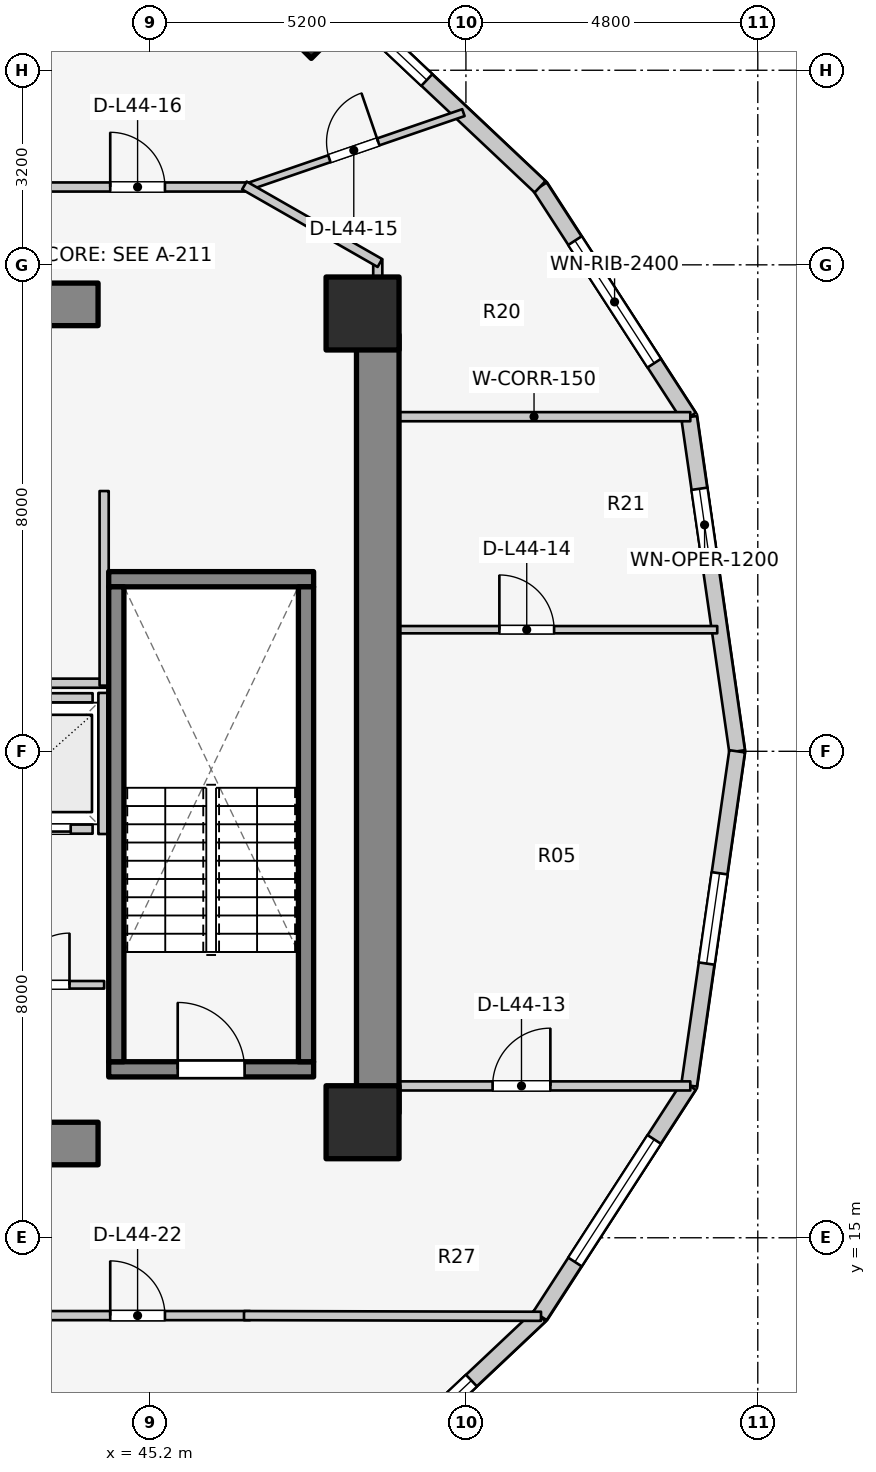
"""IFC4 building model, lengths in metres.
Left out: names, types, materials, properties, quantities, classifications, styles, units other than length and angle.
Written with IfcOpenShell. Run it as: python <this file> out.ifc"""

import sys

from ifc_helpers import new_model, si_unit, direction, frame, frame_2d, origin, origin_2d, place, context, subcontext, project, spatial, rectangle, extrude, element, fill, save


model = new_model("IFC4")
c1 = context("Model", 3, precision=1e-05, world=origin(), true_north=direction((0.0, 1.0)))
c2 = subcontext(c1, "Body", "Model", "MODEL_VIEW")
j1 = project(units=[si_unit("LENGTHUNIT", "METRE"), si_unit("PLANEANGLEUNIT", "RADIAN")], contexts=[c1])
p1 = place(None, origin())
s1 = spatial("IfcSite", under=j1, at=p1, CompositionType="ELEMENT")
p2 = place(p1, origin())
s2 = spatial("IfcBuilding", under=s1, at=p2, CompositionType="ELEMENT")
p3 = place(p2, frame((0.0, 0.0, 146.7)))
s3 = spatial("IfcBuildingStorey", under=s2, at=p3, CompositionType="ELEMENT", Elevation=146.7)
p4 = place(p3, frame((48.95, 17.05, 0.0), z_axis=(0.0, 0.0, 1.0), x_axis=(0.0, 1.0, 0.0)))
e1 = element("IfcWall", 1, at=p4, inside=s3, PredefinedType="SHEAR", context=c2, shape_type="SweptSolid", body=[
    extrude(rectangle(XDim=12.8, YDim=0.7, at=frame_2d((6.4, 0.0))), origin(), (0.0, 0.0, 1.0), 3.1),
])
for number, where, z_axis, x_axis in (
    (2, (39.85, 16.55, 0.0), (0.0, 0.0, 1.0), (1.0, 0.0, 0.0)),
    (3, (39.85, 30.35, 0.0), (0.0, 0.0, 1.0), (1.0, 0.0, 0.0)),
):
    element("IfcWall", number, at=place(p3, frame(where, z_axis=z_axis, x_axis=x_axis)), inside=s3, PredefinedType="SHEAR", context=c2, shape_type="SweptSolid", body=[
        extrude(rectangle(XDim=4.5, YDim=0.7, at=frame_2d((2.25, 0.0))), origin(), (0.0, 0.0, 1.0), 3.1),
    ])
p5 = place(p3, frame((44.525, 17.77, 0.0), z_axis=(0.0, 0.0, 1.0), x_axis=(1.0, 0.0, 0.0)))
e4 = element("IfcWall", 4, at=p5, inside=s3, PredefinedType="SOLIDWALL", context=c2, shape_type="SweptSolid", body=[
    extrude(rectangle(XDim=3.37, YDim=0.25, at=frame_2d((1.685, 0.0))), origin(), (0.0, 0.0, 1.0), 3.1),
])
p6 = place(p5, frame((1.135, 0.0, 0.0)))
e5 = element("IfcOpeningElement", 5, at=p6, cuts=e4, PredefinedType="OPENING", context=c2, shape_type="SweptSolid", body=[
    extrude(rectangle(XDim=1.1, YDim=2.1, at=frame_2d((0.55, 1.05))), frame((0.0, 0.135, 0.0), z_axis=(0.0, -1.0, 0.0), x_axis=(1.0, 0.0, 0.0)), (0.0, 0.0, 1.0), 0.27),
])
p7 = place(p3, frame((44.525, 25.83, 0.0), z_axis=(0.0, 0.0, 1.0), x_axis=(1.0, 0.0, 0.0)))
e6 = element("IfcWall", 6, at=p7, inside=s3, PredefinedType="SOLIDWALL", context=c2, shape_type="SweptSolid", body=[
    extrude(rectangle(XDim=3.37, YDim=0.25, at=frame_2d((1.685, 0.0))), origin(), (0.0, 0.0, 1.0), 3.1),
])
for number, where, z_axis, x_axis in (
    (7, (44.65, 17.895, 0.0), (0.0, 0.0, 1.0), (0.0, 1.0, 0.0)),
    (8, (47.77, 17.895, 0.0), (0.0, 0.0, 1.0), (0.0, 1.0, 0.0)),
):
    element("IfcWall", number, at=place(p3, frame(where, z_axis=z_axis, x_axis=x_axis)), inside=s3, PredefinedType="SOLIDWALL", context=c2, shape_type="SweptSolid", body=[
        extrude(rectangle(XDim=7.81, YDim=0.25, at=frame_2d((3.905, 0.0))), origin(), (0.0, 0.0, 1.0), 3.1),
    ])
for number, where, z_axis, x_axis in (
    (9, (48.7, 16.9, 0.0), (0.0, 0.0, 1.0), (1.0, 0.0, 0.0)),
    (10, (48.7, 30.2, 0.0), (0.0, 0.0, 1.0), (1.0, 0.0, 0.0)),
):
    element("IfcColumn", number, at=place(p3, frame(where, z_axis=z_axis, x_axis=x_axis)), inside=s3, PredefinedType="COLUMN", context=c2, shape_type="SweptSolid", body=[
        extrude(rectangle(XDim=1.2, YDim=1.2, at=origin_2d()), origin(), (0.0, 0.0, 1.0), 3.1),
    ])
p8 = place(p3, frame((47.857, 35.031, 0.0), z_axis=(0.0, 0.0, 1.0), x_axis=(0.707106781187, 0.707106781187, 0.0)))
e11 = element("IfcColumn", 11, at=p8, inside=s3, PredefinedType="COLUMN", context=c2, shape_type="SweptSolid", body=[
    extrude(rectangle(XDim=0.9, YDim=0.9, at=origin_2d()), origin(), (0.0, 0.0, 1.0), 3.1),
])
p9 = place(p3, frame((54.86, 23.0, 0.0), z_axis=(0.0, 0.0, 1.0), x_axis=(-0.142227632286, 0.989833976288, 0.0)))
e12 = element("IfcWall", 12, at=p9, inside=s3, PredefinedType="STANDARD", context=c2, shape_type="SweptSolid", body=[
    extrude(rectangle(XDim=5.553, YDim=0.26, at=frame_2d((2.776, 0.0))), origin(), (0.0, 0.0, 1.0), 2.85),
])
p10 = place(p9, frame((3.162, 0.0, 0.75)))
e13 = element("IfcOpeningElement", 13, at=p10, cuts=e12, PredefinedType="OPENING", context=c2, shape_type="SweptSolid", body=[
    extrude(rectangle(XDim=1.2, YDim=1.5, at=frame_2d((0.6, 0.75))), frame((0.0, 0.14, 0.0), z_axis=(0.0, -1.0, 0.0), x_axis=(1.0, 0.0, 0.0)), (0.0, 0.0, 1.0), 0.28),
])
p11 = place(p3, frame((54.07, 28.497, 0.0), z_axis=(0.0, 0.0, 1.0), x_axis=(-0.543358984534, 0.839500454989, 0.0)))
e14 = element("IfcWall", 14, at=p11, inside=s3, PredefinedType="STANDARD", context=c2, shape_type="SweptSolid", body=[
    extrude(rectangle(XDim=4.511, YDim=0.26, at=frame_2d((2.256, 0.0))), origin(), (0.0, 0.0, 1.0), 2.85),
])
p12 = place(p11, frame((1.056, 0.0, 0.75)))
e15 = element("IfcOpeningElement", 15, at=p12, cuts=e14, PredefinedType="OPENING", context=c2, shape_type="SweptSolid", body=[
    extrude(rectangle(XDim=2.4, YDim=1.7, at=frame_2d((1.2, 0.85))), frame((0.0, 0.14, 0.0), z_axis=(0.0, -1.0, 0.0), x_axis=(1.0, 0.0, 0.0)), (0.0, 0.0, 1.0), 0.28),
])
p13 = place(p3, frame((51.619, 32.284, 0.0), z_axis=(0.0, 0.0, 1.0), x_axis=(-0.727667301037, 0.68593024354, 0.0)))
e16 = element("IfcWall", 16, at=p13, inside=s3, PredefinedType="STANDARD", context=c2, shape_type="SweptSolid", body=[
    extrude(rectangle(XDim=4.604, YDim=0.26, at=frame_2d((2.302, 0.0))), origin(), (0.0, 0.0, 1.0), 2.85),
])
p14 = place(p13, frame((2.56, 0.0, 0.75)))
e17 = element("IfcOpeningElement", 17, at=p14, cuts=e16, PredefinedType="OPENING", context=c2, shape_type="SweptSolid", body=[
    extrude(rectangle(XDim=1.2, YDim=1.5, at=frame_2d((0.6, 0.75))), frame((0.0, 0.14, 0.0), z_axis=(0.0, -1.0, 0.0), x_axis=(1.0, 0.0, 0.0)), (0.0, 0.0, 1.0), 0.28),
])
p15 = place(p3, frame((48.269, 10.559, 0.0), z_axis=(0.0, 0.0, 1.0), x_axis=(0.727667301037, 0.68593024354, 0.0)))
e18 = element("IfcWall", 18, at=p15, inside=s3, PredefinedType="STANDARD", context=c2, shape_type="SweptSolid", body=[
    extrude(rectangle(XDim=4.604, YDim=0.26, at=frame_2d((2.302, 0.0))), origin(), (0.0, 0.0, 1.0), 2.85),
])
p16 = place(p15, frame((1.552, 0.0, 0.75)))
e19 = element("IfcOpeningElement", 19, at=p16, cuts=e18, PredefinedType="OPENING", context=c2, shape_type="SweptSolid", body=[
    extrude(rectangle(XDim=1.5, YDim=1.6, at=frame_2d((0.75, 0.8))), frame((0.0, 0.14, 0.0), z_axis=(0.0, -1.0, 0.0), x_axis=(1.0, 0.0, 0.0)), (0.0, 0.0, 1.0), 0.28),
])
p17 = place(p3, frame((51.619, 13.716, 0.0), z_axis=(0.0, 0.0, 1.0), x_axis=(0.543358984534, 0.839500454989, 0.0)))
e20 = element("IfcWall", 20, at=p17, inside=s3, PredefinedType="STANDARD", context=c2, shape_type="SweptSolid", body=[
    extrude(rectangle(XDim=4.511, YDim=0.26, at=frame_2d((2.256, 0.0))), origin(), (0.0, 0.0, 1.0), 2.85),
])
p18 = place(p17, frame((1.056, 0.0, 0.75)))
e21 = element("IfcOpeningElement", 21, at=p18, cuts=e20, PredefinedType="OPENING", context=c2, shape_type="SweptSolid", body=[
    extrude(rectangle(XDim=2.4, YDim=1.7, at=frame_2d((1.2, 0.85))), frame((0.0, 0.14, 0.0), z_axis=(0.0, -1.0, 0.0), x_axis=(1.0, 0.0, 0.0)), (0.0, 0.0, 1.0), 0.28),
])
p19 = place(p3, frame((54.07, 17.503, 0.0), z_axis=(0.0, 0.0, 1.0), x_axis=(0.142227632286, 0.989833976288, 0.0)))
e22 = element("IfcWall", 22, at=p19, inside=s3, PredefinedType="STANDARD", context=c2, shape_type="SweptSolid", body=[
    extrude(rectangle(XDim=5.553, YDim=0.26, at=frame_2d((2.776, 0.0))), origin(), (0.0, 0.0, 1.0), 2.85),
])
p20 = place(p19, frame((2.027, 0.0, 0.75)))
e23 = element("IfcOpeningElement", 23, at=p20, cuts=e22, PredefinedType="OPENING", context=c2, shape_type="SweptSolid", body=[
    extrude(rectangle(XDim=1.5, YDim=1.6, at=frame_2d((0.75, 0.8))), frame((0.0, 0.14, 0.0), z_axis=(0.0, -1.0, 0.0), x_axis=(1.0, 0.0, 0.0)), (0.0, 0.0, 1.0), 0.28),
])
p21 = place(p3, frame((42.44, 21.72, 0.0), z_axis=(0.0, 0.0, 1.0), x_axis=(1.0, 0.0, 0.0)))
e24 = element("IfcWall", 24, at=p21, inside=s3, PredefinedType="SOLIDWALL", context=c2, shape_type="SweptSolid", body=[
    extrude(rectangle(XDim=1.82, YDim=0.15, at=frame_2d((0.91, 0.0))), origin(), (0.0, 0.0, 1.0), 2.855),
])
p22 = place(p21, frame((0.36, 0.0, 0.0)))
e25 = element("IfcOpeningElement", 25, at=p22, cuts=e24, PredefinedType="OPENING", context=c2, shape_type="SweptSolid", body=[
    extrude(rectangle(XDim=1.1, YDim=2.1, at=frame_2d((0.55, 1.05))), frame((0.0, 0.085, 0.0), z_axis=(0.0, -1.0, 0.0), x_axis=(1.0, 0.0, 0.0)), (0.0, 0.0, 1.0), 0.17),
])
p23 = place(p3, frame((42.44, 23.88, 0.0), z_axis=(0.0, 0.0, 1.0), x_axis=(1.0, 0.0, 0.0)))
e26 = element("IfcWall", 26, at=p23, inside=s3, PredefinedType="SOLIDWALL", context=c2, shape_type="SweptSolid", body=[
    extrude(rectangle(XDim=1.82, YDim=0.15, at=frame_2d((0.91, 0.0))), origin(), (0.0, 0.0, 1.0), 2.855),
])
p24 = place(p3, frame((44.43, 21.64, 0.0), z_axis=(0.0, 0.0, 1.0), x_axis=(0.0, 1.0, 0.0)))
e27 = element("IfcWall", 27, at=p24, inside=s3, PredefinedType="SOLIDWALL", context=c2, shape_type="SweptSolid", body=[
    extrude(rectangle(XDim=2.32, YDim=0.15, at=frame_2d((1.16, 0.0))), origin(), (0.0, 0.0, 1.0), 2.855),
])
p25 = place(p3, frame((39.4, 24.12, 0.0), z_axis=(0.0, 0.0, 1.0), x_axis=(1.0, 0.0, 0.0)))
e28 = element("IfcWall", 28, at=p25, inside=s3, PredefinedType="PARTITIONING", context=c2, shape_type="SweptSolid", body=[
    extrude(rectangle(XDim=5.08, YDim=0.15, at=frame_2d((2.54, 0.0))), origin(), (0.0, 0.0, 1.0), 2.12),
])
p26 = place(p3, frame((44.45, 24.08, 0.0), z_axis=(0.0, 0.0, 1.0), x_axis=(0.0, 1.0, 0.0)))
e29 = element("IfcWall", 29, at=p26, inside=s3, PredefinedType="PARTITIONING", context=c2, shape_type="SweptSolid", body=[
    extrude(rectangle(XDim=3.2, YDim=0.15, at=frame_2d((1.6, 0.0))), origin(), (0.0, 0.0, 1.0), 2.855),
])
p27 = place(p3, frame((39.58, 19.16, 0.0), z_axis=(0.0, 0.0, 1.0), x_axis=(1.0, 0.0, 0.0)))
e30 = element("IfcWall", 30, at=p27, inside=s3, PredefinedType="PARTITIONING", context=c2, shape_type="SweptSolid", body=[
    extrude(rectangle(XDim=4.87, YDim=0.125, at=frame_2d((2.435, 0.0))), origin(), (0.0, 0.0, 1.0), 2.12),
])
p28 = place(p27, frame((3.45, 0.0, 0.0)))
e31 = element("IfcOpeningElement", 31, at=p28, cuts=e30, PredefinedType="OPENING", context=c2, shape_type="SweptSolid", body=[
    extrude(rectangle(XDim=0.85, YDim=2.05, at=frame_2d((0.425, 1.025))), frame((0.0, 0.073, 0.0), z_axis=(0.0, -1.0, 0.0), x_axis=(1.0, 0.0, 0.0)), (0.0, 0.0, 1.0), 0.145),
])
p29 = place(p3, frame((48.95, 17.497, 0.0), z_axis=(0.0, 0.0, 1.0), x_axis=(1.0, 0.0, 0.0)))
e32 = element("IfcWall", 32, at=p29, inside=s3, PredefinedType="PARTITIONING", context=c2, shape_type="SweptSolid", body=[
    extrude(rectangle(XDim=5.14, YDim=0.15, at=frame_2d((2.57, 0.0))), origin(), (0.0, 0.0, 1.0), 2.855),
])
p30 = place(p29, frame((1.889, 0.0, 0.0)))
e33 = element("IfcOpeningElement", 33, at=p30, cuts=e32, PredefinedType="OPENING", context=c2, shape_type="SweptSolid", body=[
    extrude(rectangle(XDim=0.95, YDim=2.1, at=frame_2d((0.475, 1.05))), frame((0.0, 0.085, 0.0), z_axis=(0.0, -1.0, 0.0), x_axis=(1.0, 0.0, 0.0)), (0.0, 0.0, 1.0), 0.17),
])
p31 = place(p3, frame((48.95, 28.503, 0.0), z_axis=(0.0, 0.0, 1.0), x_axis=(1.0, 0.0, 0.0)))
e34 = element("IfcWall", 34, at=p31, inside=s3, PredefinedType="PARTITIONING", context=c2, shape_type="SweptSolid", body=[
    extrude(rectangle(XDim=5.14, YDim=0.15, at=frame_2d((2.57, 0.0))), origin(), (0.0, 0.0, 1.0), 2.855),
])
p32 = place(p3, frame((48.95, 25.0, 0.0), z_axis=(0.0, 0.0, 1.0), x_axis=(1.0, 0.0, 0.0)))
e35 = element("IfcWall", 35, at=p32, inside=s3, PredefinedType="MOVABLE", context=c2, shape_type="SweptSolid", body=[
    extrude(rectangle(XDim=5.583, YDim=0.12, at=frame_2d((2.792, 0.0))), origin(), (0.0, 0.0, 1.0), 2.855),
])
p33 = place(p32, frame((2.0, 0.0, 0.0)))
e36 = element("IfcOpeningElement", 36, at=p33, cuts=e35, PredefinedType="OPENING", context=c2, shape_type="SweptSolid", body=[
    extrude(rectangle(XDim=0.9, YDim=2.1, at=frame_2d((0.45, 1.05))), frame((0.0, 0.07, 0.0), z_axis=(0.0, -1.0, 0.0), x_axis=(1.0, 0.0, 0.0)), (0.0, 0.0, 1.0), 0.14),
])
p34 = place(p3, frame((48.95, 29.8, 0.0), z_axis=(0.0, 0.0, 1.0), x_axis=(0.0, 1.0, 0.0)))
e37 = element("IfcWall", 37, at=p34, inside=s3, PredefinedType="PARTITIONING", context=c2, shape_type="SweptSolid", body=[
    extrude(rectangle(XDim=1.29, YDim=0.15, at=frame_2d((0.645, 0.0))), origin(), (0.0, 0.0, 1.0), 2.855),
])
p35 = place(p3, frame((46.753, 32.264, 0.0), z_axis=(0.0, 0.0, 1.0), x_axis=(0.945683523506, 0.325088716151, 0.0)))
e38 = element("IfcWall", 38, at=p35, inside=s3, PredefinedType="MOVABLE", context=c2, shape_type="SweptSolid", body=[
    extrude(rectangle(XDim=3.813, YDim=0.12, at=frame_2d((1.906, 0.0))), origin(), (0.0, 0.0, 1.0), 2.22),
])
p36 = place(p35, frame((1.481, 0.0, 0.0)))
e39 = element("IfcOpeningElement", 39, at=p36, cuts=e38, PredefinedType="OPENING", context=c2, shape_type="SweptSolid", body=[
    extrude(rectangle(XDim=0.85, YDim=2.05, at=frame_2d((0.425, 1.025))), frame((0.0, 0.07, 0.0), z_axis=(0.0, -1.0, 0.0), x_axis=(1.0, 0.0, 0.0)), (0.0, 0.0, 1.0), 0.14),
])
p37 = place(p3, frame((39.33, 32.28, 0.0), z_axis=(0.0, 0.0, 1.0), x_axis=(1.0, 0.0, 0.0)))
e40 = element("IfcWall", 40, at=p37, inside=s3, PredefinedType="PARTITIONING", context=c2, shape_type="SweptSolid", body=[
    extrude(rectangle(XDim=7.52, YDim=0.15, at=frame_2d((3.76, 0.0))), origin(), (0.0, 0.0, 1.0), 2.299),
])
p38 = place(p37, frame((5.22, 0.0, 0.0)))
e41 = element("IfcOpeningElement", 41, at=p38, cuts=e40, PredefinedType="OPENING", context=c2, shape_type="SweptSolid", body=[
    extrude(rectangle(XDim=0.9, YDim=2.1, at=frame_2d((0.45, 1.05))), frame((0.0, 0.085, 0.0), z_axis=(0.0, -1.0, 0.0), x_axis=(1.0, 0.0, 0.0)), (0.0, 0.0, 1.0), 0.17),
])
p39 = place(p3, frame((46.757, 32.305, 0.0), z_axis=(0.0, 0.0, 1.0), x_axis=(0.867991349648, -0.496579315857, 0.0)))
e42 = element("IfcWall", 42, at=p39, inside=s3, PredefinedType="PARTITIONING", context=c2, shape_type="SweptSolid", body=[
    extrude(rectangle(XDim=2.567, YDim=0.15, at=frame_2d((1.283, 0.0))), origin(), (0.0, 0.0, 1.0), 2.22),
])
p40 = place(p3, frame((39.33, 13.72, 0.0), z_axis=(0.0, 0.0, 1.0), x_axis=(1.0, 0.0, 0.0)))
e43 = element("IfcWall", 43, at=p40, inside=s3, PredefinedType="PARTITIONING", context=c2, shape_type="SweptSolid", body=[
    extrude(rectangle(XDim=7.52, YDim=0.15, at=frame_2d((3.76, 0.0))), origin(), (0.0, 0.0, 1.0), 2.299),
])
p41 = place(p40, frame((5.22, 0.0, 0.0)))
e44 = element("IfcOpeningElement", 44, at=p41, cuts=e43, PredefinedType="OPENING", context=c2, shape_type="SweptSolid", body=[
    extrude(rectangle(XDim=0.9, YDim=2.1, at=frame_2d((0.45, 1.05))), frame((0.0, 0.085, 0.0), z_axis=(0.0, -1.0, 0.0), x_axis=(1.0, 0.0, 0.0)), (0.0, 0.0, 1.0), 0.17),
])
p42 = place(p3, frame((46.75, 13.72, 0.0), z_axis=(0.0, 0.0, 1.0), x_axis=(0.999997122315, -0.00239903348, 0.0)))
e45 = element("IfcWall", 45, at=p42, inside=s3, PredefinedType="PARTITIONING", context=c2, shape_type="SweptSolid", body=[
    extrude(rectangle(XDim=4.885, YDim=0.15, at=frame_2d((2.442, 0.0))), origin(), (0.0, 0.0, 1.0), 2.22),
])
p43 = place(p3, frame((37.875, 33.816, 0.0), z_axis=(0.0, 0.0, 1.0), x_axis=(0.849008457073, 0.528379257559, 0.0)))
e46 = element("IfcWall", 46, at=p43, inside=s3, PredefinedType="PARTITIONING", context=c2, shape_type="SweptSolid", body=[
    extrude(rectangle(XDim=7.077, YDim=0.125, at=frame_2d((3.539, 0.0))), origin(), (0.0, 0.0, 1.0), 2.299),
])
p44 = place(p10, origin())
e47 = element("IfcWindow", 47, at=p44, inside=s3, PartitioningType="SINGLE_PANEL", PredefinedType="WINDOW", context=c2, shape_type="SweptSolid", body=[
    extrude(rectangle(XDim=1.2, YDim=1.5, at=frame_2d((0.6, 0.75))), frame((0.0, 0.03, 0.0), z_axis=(0.0, -1.0, 0.0), x_axis=(1.0, 0.0, 0.0)), (0.0, 0.0, 1.0), 0.06),
])
fill(e13, e47)
p45 = place(p12, origin())
e48 = element("IfcWindow", 48, at=p45, inside=s3, PartitioningType="SINGLE_PANEL", PredefinedType="WINDOW", context=c2, shape_type="SweptSolid", body=[
    extrude(rectangle(XDim=2.4, YDim=1.7, at=frame_2d((1.2, 0.85))), frame((0.0, 0.03, 0.0), z_axis=(0.0, -1.0, 0.0), x_axis=(1.0, 0.0, 0.0)), (0.0, 0.0, 1.0), 0.06),
])
fill(e15, e48)
p46 = place(p14, origin())
e49 = element("IfcWindow", 49, at=p46, inside=s3, PartitioningType="SINGLE_PANEL", PredefinedType="WINDOW", context=c2, shape_type="SweptSolid", body=[
    extrude(rectangle(XDim=1.2, YDim=1.5, at=frame_2d((0.6, 0.75))), frame((0.0, 0.03, 0.0), z_axis=(0.0, -1.0, 0.0), x_axis=(1.0, 0.0, 0.0)), (0.0, 0.0, 1.0), 0.06),
])
fill(e17, e49)
p47 = place(p16, origin())
e50 = element("IfcWindow", 50, at=p47, inside=s3, PartitioningType="SINGLE_PANEL", PredefinedType="WINDOW", context=c2, shape_type="SweptSolid", body=[
    extrude(rectangle(XDim=1.5, YDim=1.6, at=frame_2d((0.75, 0.8))), frame((0.0, 0.03, 0.0), z_axis=(0.0, -1.0, 0.0), x_axis=(1.0, 0.0, 0.0)), (0.0, 0.0, 1.0), 0.06),
])
fill(e19, e50)
p48 = place(p18, origin())
e51 = element("IfcWindow", 51, at=p48, inside=s3, PartitioningType="SINGLE_PANEL", PredefinedType="WINDOW", context=c2, shape_type="SweptSolid", body=[
    extrude(rectangle(XDim=2.4, YDim=1.7, at=frame_2d((1.2, 0.85))), frame((0.0, 0.03, 0.0), z_axis=(0.0, -1.0, 0.0), x_axis=(1.0, 0.0, 0.0)), (0.0, 0.0, 1.0), 0.06),
])
fill(e21, e51)
p49 = place(p20, origin())
e52 = element("IfcWindow", 52, at=p49, inside=s3, PartitioningType="SINGLE_PANEL", PredefinedType="WINDOW", context=c2, shape_type="SweptSolid", body=[
    extrude(rectangle(XDim=1.5, YDim=1.6, at=frame_2d((0.75, 0.8))), frame((0.0, 0.03, 0.0), z_axis=(0.0, -1.0, 0.0), x_axis=(1.0, 0.0, 0.0)), (0.0, 0.0, 1.0), 0.06),
])
fill(e23, e52)
p50 = place(p6, origin())
e53 = element("IfcDoor", 53, at=p50, inside=s3, OperationType="SINGLE_SWING_LEFT", PredefinedType="DOOR", context=c2, shape_type="SweptSolid", body=[
    extrude(rectangle(XDim=1.1, YDim=2.1, at=frame_2d((0.55, 1.05))), frame((0.0, 0.025, 0.0), z_axis=(0.0, -1.0, 0.0), x_axis=(1.0, 0.0, 0.0)), (0.0, 0.0, 1.0), 0.05),
])
fill(e5, e53)
p51 = place(p22, origin())
e54 = element("IfcDoor", 54, at=p51, inside=s3, OperationType="DOUBLE_DOOR_SLIDING", PredefinedType="DOOR", context=c2, shape_type="SweptSolid", body=[
    extrude(rectangle(XDim=1.1, YDim=2.1, at=frame_2d((0.55, 1.05))), frame((0.0, 0.025, 0.0), z_axis=(0.0, -1.0, 0.0), x_axis=(1.0, 0.0, 0.0)), (0.0, 0.0, 1.0), 0.05),
])
fill(e25, e54)
p52 = place(p28, origin())
e55 = element("IfcDoor", 55, at=p52, inside=s3, OperationType="SINGLE_SWING_RIGHT", PredefinedType="DOOR", context=c2, shape_type="SweptSolid", body=[
    extrude(rectangle(XDim=0.85, YDim=2.05, at=frame_2d((0.425, 1.025))), frame((0.0, 0.025, 0.0), z_axis=(0.0, -1.0, 0.0), x_axis=(1.0, 0.0, 0.0)), (0.0, 0.0, 1.0), 0.05),
])
fill(e31, e55)
p53 = place(p30, origin())
e56 = element("IfcDoor", 56, at=p53, inside=s3, OperationType="SINGLE_SWING_RIGHT", PredefinedType="DOOR", context=c2, shape_type="SweptSolid", body=[
    extrude(rectangle(XDim=0.95, YDim=2.1, at=frame_2d((0.475, 1.05))), frame((0.0, 0.025, 0.0), z_axis=(0.0, -1.0, 0.0), x_axis=(1.0, 0.0, 0.0)), (0.0, 0.0, 1.0), 0.05),
])
fill(e33, e56)
p54 = place(p33, origin())
e57 = element("IfcDoor", 57, at=p54, inside=s3, OperationType="SINGLE_SWING_LEFT", PredefinedType="DOOR", context=c2, shape_type="SweptSolid", body=[
    extrude(rectangle(XDim=0.9, YDim=2.1, at=frame_2d((0.45, 1.05))), frame((0.0, 0.025, 0.0), z_axis=(0.0, -1.0, 0.0), x_axis=(1.0, 0.0, 0.0)), (0.0, 0.0, 1.0), 0.05),
])
fill(e36, e57)
p55 = place(p36, origin())
e58 = element("IfcDoor", 58, at=p55, inside=s3, OperationType="SINGLE_SWING_RIGHT", PredefinedType="DOOR", context=c2, shape_type="SweptSolid", body=[
    extrude(rectangle(XDim=0.85, YDim=2.05, at=frame_2d((0.425, 1.025))), frame((0.0, 0.025, 0.0), z_axis=(0.0, -1.0, 0.0), x_axis=(1.0, 0.0, 0.0)), (0.0, 0.0, 1.0), 0.05),
])
fill(e39, e58)
p56 = place(p38, origin())
e59 = element("IfcDoor", 59, at=p56, inside=s3, OperationType="SINGLE_SWING_LEFT", PredefinedType="DOOR", context=c2, shape_type="SweptSolid", body=[
    extrude(rectangle(XDim=0.9, YDim=2.1, at=frame_2d((0.45, 1.05))), frame((0.0, 0.025, 0.0), z_axis=(0.0, -1.0, 0.0), x_axis=(1.0, 0.0, 0.0)), (0.0, 0.0, 1.0), 0.05),
])
fill(e41, e59)
p57 = place(p41, origin())
e60 = element("IfcDoor", 60, at=p57, inside=s3, OperationType="SINGLE_SWING_LEFT", PredefinedType="DOOR", context=c2, shape_type="SweptSolid", body=[
    extrude(rectangle(XDim=0.9, YDim=2.1, at=frame_2d((0.45, 1.05))), frame((0.0, 0.025, 0.0), z_axis=(0.0, -1.0, 0.0), x_axis=(1.0, 0.0, 0.0)), (0.0, 0.0, 1.0), 0.05),
])
fill(e44, e60)
save(model, sys.argv[1])
